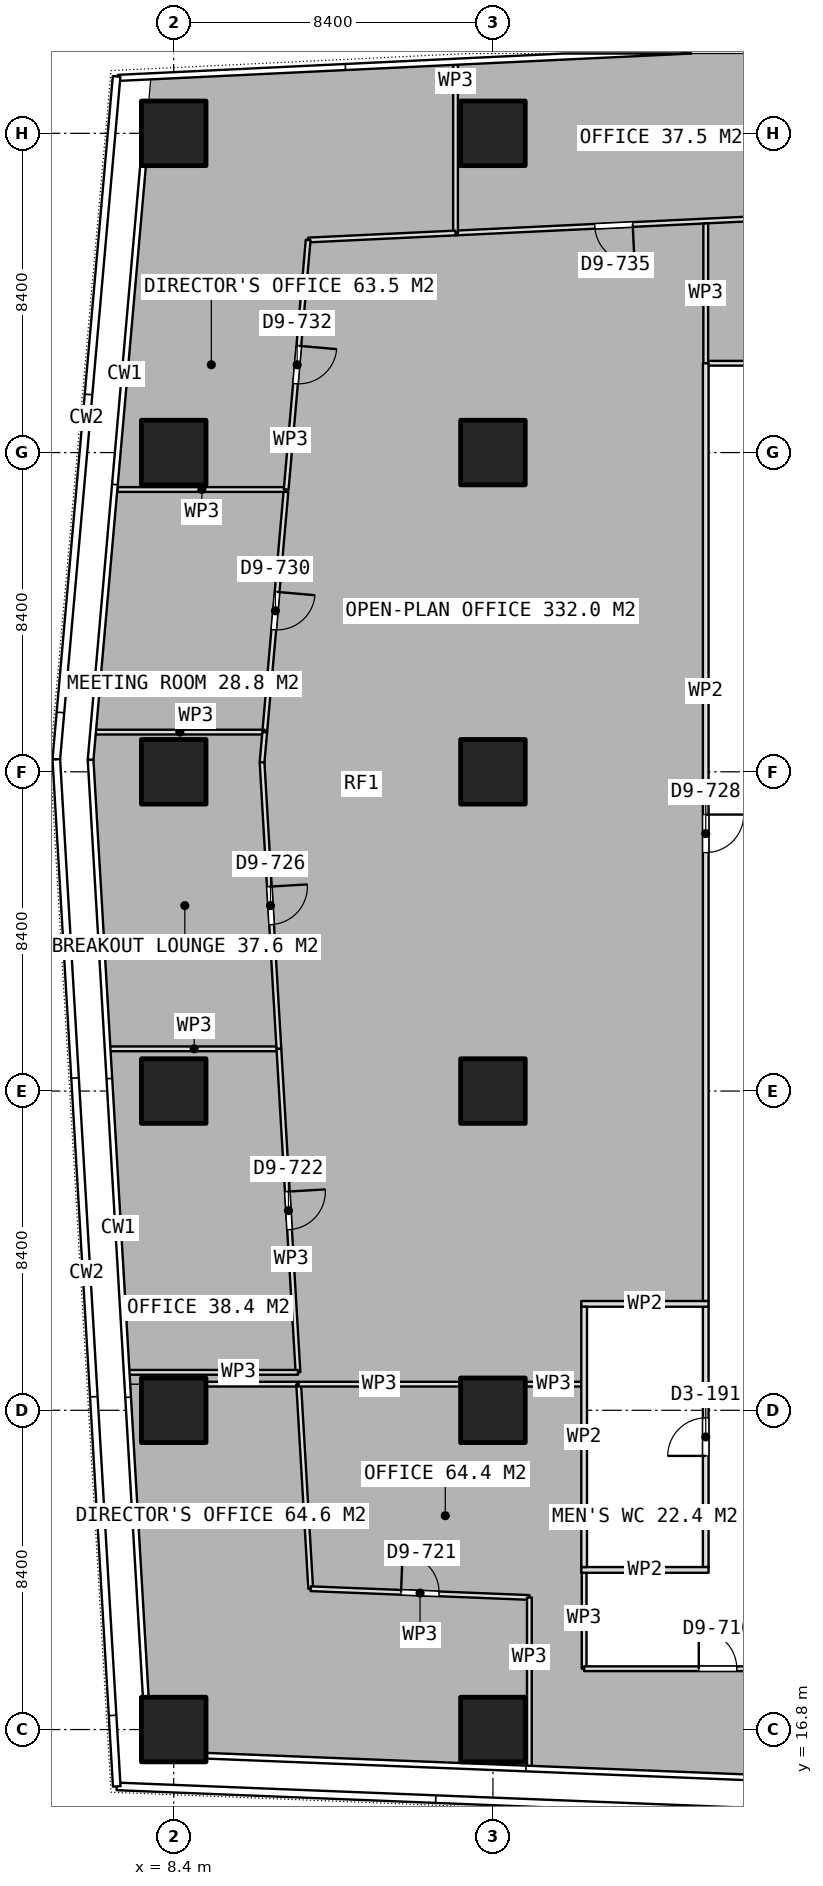
"""IFC4 building model, lengths in metres.
Left out: names, types, materials, properties, quantities, classifications, styles, units other than length and angle.
Written with IfcOpenShell. Run it as: python <this file> out.ifc"""

import sys

from ifc_helpers import new_model, si_unit, direction, frame, frame_2d, origin, origin_2d, place, context, subcontext, project, spatial, rectangle, extrude, element, fill, save


model = new_model("IFC4")
c1 = context("Model", 3, precision=1e-05, world=origin(), true_north=direction((0.0, 1.0)))
c2 = subcontext(c1, "Body", "Model", "MODEL_VIEW")
j1 = project(units=[si_unit("LENGTHUNIT", "METRE"), si_unit("PLANEANGLEUNIT", "RADIAN")], contexts=[c1])
p1 = place(None, origin())
s1 = spatial("IfcSite", under=j1, at=p1, CompositionType="ELEMENT")
p2 = place(p1, origin())
s2 = spatial("IfcBuilding", under=s1, at=p2, CompositionType="ELEMENT")
p3 = place(p2, frame((0.0, 0.0, 183.95)))
s3 = spatial("IfcBuildingStorey", under=s2, at=p3, CompositionType="ELEMENT", Elevation=183.95)
for number, where, z_axis, x_axis in (
    (1, (8.4, 16.8, 0.0), (0.0, 0.0, 1.0), (1.0, 0.0, 0.0)),
    (2, (8.4, 25.2, 0.0), (0.0, 0.0, 1.0), (1.0, 0.0, 0.0)),
    (3, (8.4, 33.6, 0.0), (0.0, 0.0, 1.0), (1.0, 0.0, 0.0)),
    (4, (8.4, 42.0, 0.0), (0.0, 0.0, 1.0), (1.0, 0.0, 0.0)),
    (5, (8.4, 50.4, 0.0), (0.0, 0.0, 1.0), (1.0, 0.0, 0.0)),
    (6, (8.4, 58.8, 0.0), (0.0, 0.0, 1.0), (1.0, 0.0, 0.0)),
    (7, (16.8, 16.8, 0.0), (0.0, 0.0, 1.0), (1.0, 0.0, 0.0)),
    (8, (16.8, 25.2, 0.0), (0.0, 0.0, 1.0), (1.0, 0.0, 0.0)),
    (9, (16.8, 33.6, 0.0), (0.0, 0.0, 1.0), (1.0, 0.0, 0.0)),
    (10, (16.8, 42.0, 0.0), (0.0, 0.0, 1.0), (1.0, 0.0, 0.0)),
    (11, (16.8, 50.4, 0.0), (0.0, 0.0, 1.0), (1.0, 0.0, 0.0)),
    (12, (16.8, 58.8, 0.0), (0.0, 0.0, 1.0), (1.0, 0.0, 0.0)),
):
    element("IfcColumn", number, at=place(p3, frame(where, z_axis=z_axis, x_axis=x_axis)), inside=s3, PredefinedType="COLUMN", context=c2, shape_type="SweptSolid", body=[
        extrude(rectangle(XDim=1.7, YDim=1.7, at=origin_2d()), origin(), (0.0, 0.0, 1.0), 3.75),
    ])
for number, where, z_axis, x_axis in (
    (13, (19.125, 21.0, 0.0), (0.0, 0.0, 1.0), (1.0, 0.0, 0.0)),
    (14, (19.125, 28.0, 0.0), (0.0, 0.0, 1.0), (1.0, 0.0, 0.0)),
):
    element("IfcWall", number, at=place(p3, frame(where, z_axis=z_axis, x_axis=x_axis)), inside=s3, PredefinedType="PARTITIONING", context=c2, shape_type="SweptSolid", body=[
        extrude(rectangle(XDim=3.35, YDim=0.15, at=frame_2d((1.675, 0.0))), origin(), (0.0, 0.0, 1.0), 3.5),
    ])
p4 = place(p3, frame((19.2, 21.075, 0.0), z_axis=(0.0, 0.0, 1.0), x_axis=(0.0, 1.0, 0.0)))
e15 = element("IfcWall", 15, at=p4, inside=s3, PredefinedType="PARTITIONING", context=c2, shape_type="SweptSolid", body=[
    extrude(rectangle(XDim=6.85, YDim=0.15, at=frame_2d((3.425, 0.0))), origin(), (0.0, 0.0, 1.0), 3.5),
])
p5 = place(p3, frame((22.4, 21.075, 0.0), z_axis=(0.0, 0.0, 1.0), x_axis=(0.0, 1.0, 0.0)))
e16 = element("IfcWall", 16, at=p5, inside=s3, PredefinedType="PARTITIONING", context=c2, shape_type="SweptSolid", body=[
    extrude(rectangle(XDim=6.85, YDim=0.15, at=frame_2d((3.425, 0.0))), origin(), (0.0, 0.0, 1.0), 3.5),
])
p6 = place(p5, frame((2.925, 0.0, 0.0)))
e17 = element("IfcOpeningElement", 17, at=p6, cuts=e16, PredefinedType="OPENING", context=c2, shape_type="SweptSolid", body=[
    extrude(rectangle(XDim=1.0, YDim=2.1, at=frame_2d((0.5, 1.05))), frame((0.0, 0.085, 0.0), z_axis=(0.0, -1.0, 0.0), x_axis=(1.0, 0.0, 0.0)), (0.0, 0.0, 1.0), 0.17),
])
p7 = place(p3, frame((9.27, 25.888, 0.0), z_axis=(0.0, 0.0, 1.0), x_axis=(1.0, 0.0, 0.0)))
e18 = element("IfcWall", 18, at=p7, inside=s3, PredefinedType="PARTITIONING", context=c2, shape_type="SweptSolid", body=[
    extrude(rectangle(XDim=2.418, YDim=0.125, at=frame_2d((1.209, 0.0))), origin(), (0.0, 0.0, 1.0), 3.5),
])
p8 = place(p3, frame((11.688, 25.888, 0.0), z_axis=(0.0, 0.0, 1.0), x_axis=(0.058767140917, -0.998271718095, 0.0)))
e19 = element("IfcWall", 19, at=p8, inside=s3, PredefinedType="PARTITIONING", context=c2, shape_type="SweptSolid", body=[
    extrude(rectangle(XDim=5.392, YDim=0.125, at=frame_2d((2.696, 0.0))), origin(), (0.0, 0.0, 1.0), 3.5),
])
p9 = place(p3, frame((12.005, 20.505, 0.0), z_axis=(0.0, 0.0, 1.0), x_axis=(0.999202244946, -0.039935869776, 0.0)))
e20 = element("IfcWall", 20, at=p9, inside=s3, PredefinedType="PARTITIONING", context=c2, shape_type="SweptSolid", body=[
    extrude(rectangle(XDim=5.759, YDim=0.125, at=frame_2d((2.879, 0.0))), origin(), (0.0, 0.0, 1.0), 3.5),
])
p10 = place(p9, frame((2.379, 0.0, 0.0)))
e21 = element("IfcOpeningElement", 21, at=p10, cuts=e20, PredefinedType="OPENING", context=c2, shape_type="SweptSolid", body=[
    extrude(rectangle(XDim=1.0, YDim=2.1, at=frame_2d((0.5, 1.05))), frame((0.0, 0.073, 0.0), z_axis=(0.0, -1.0, 0.0), x_axis=(1.0, 0.0, 0.0)), (0.0, 0.0, 1.0), 0.145),
])
p11 = place(p3, frame((17.759, 20.275, 0.0), z_axis=(0.0, 0.0, 1.0), x_axis=(0.0, -1.0, 0.0)))
e22 = element("IfcWall", 22, at=p11, inside=s3, PredefinedType="PARTITIONING", context=c2, shape_type="SweptSolid", body=[
    extrude(rectangle(XDim=4.453, YDim=0.125, at=frame_2d((2.227, 0.0))), origin(), (0.0, 0.0, 1.0), 3.5),
])
p12 = place(p3, frame((11.688, 25.888, 0.0), z_axis=(0.0, 0.0, 1.0), x_axis=(1.0, 0.0, 0.0)))
e23 = element("IfcWall", 23, at=p12, inside=s3, PredefinedType="PARTITIONING", context=c2, shape_type="SweptSolid", body=[
    extrude(rectangle(XDim=4.242, YDim=0.125, at=frame_2d((2.121, 0.0))), origin(), (0.0, 0.0, 1.0), 3.5),
])
p13 = place(p3, frame((17.67, 25.888, 0.0), z_axis=(0.0, 0.0, 1.0), x_axis=(1.0, 0.0, 0.0)))
e24 = element("IfcWall", 24, at=p13, inside=s3, PredefinedType="PARTITIONING", context=c2, shape_type="SweptSolid", body=[
    extrude(rectangle(XDim=1.455, YDim=0.125, at=frame_2d((0.728, 0.0))), origin(), (0.0, 0.0, 1.0), 3.5),
])
p14 = place(p3, frame((19.2, 21.075, 0.0), z_axis=(0.0, 0.0, 1.0), x_axis=(0.0, -1.0, 0.0)))
e25 = element("IfcWall", 25, at=p14, inside=s3, PredefinedType="PARTITIONING", context=c2, shape_type="SweptSolid", body=[
    extrude(rectangle(XDim=2.675, YDim=0.125, at=frame_2d((1.337, 0.0))), origin(), (0.0, 0.0, 1.0), 3.5),
])
p15 = place(p3, frame((19.2, 18.4, 0.0), z_axis=(0.0, 0.0, 1.0), x_axis=(1.0, 0.0, 0.0)))
e26 = element("IfcWall", 26, at=p15, inside=s3, PredefinedType="PARTITIONING", context=c2, shape_type="SweptSolid", body=[
    extrude(rectangle(XDim=7.033, YDim=0.125, at=frame_2d((3.517, 0.0))), origin(), (0.0, 0.0, 1.0), 3.5),
])
p16 = place(p15, frame((3.017, 0.0, 0.0)))
e27 = element("IfcOpeningElement", 27, at=p16, cuts=e26, PredefinedType="OPENING", context=c2, shape_type="SweptSolid", body=[
    extrude(rectangle(XDim=1.0, YDim=2.1, at=frame_2d((0.5, 1.05))), frame((0.0, 0.073, 0.0), z_axis=(0.0, -1.0, 0.0), x_axis=(1.0, 0.0, 0.0)), (0.0, 0.0, 1.0), 0.145),
])
p17 = place(p3, frame((24.142, 56.576, 0.0), z_axis=(0.0, 0.0, 1.0), x_axis=(-0.998859773086, -0.047740482938, 0.0)))
e28 = element("IfcWall", 28, at=p17, inside=s3, PredefinedType="PARTITIONING", context=c2, shape_type="SweptSolid", body=[
    extrude(rectangle(XDim=8.336, YDim=0.125, at=frame_2d((4.168, 0.0))), origin(), (0.0, 0.0, 1.0), 3.5),
])
p18 = place(p17, frame((3.668, 0.0, 0.0)))
e29 = element("IfcOpeningElement", 29, at=p18, cuts=e28, PredefinedType="OPENING", context=c2, shape_type="SweptSolid", body=[
    extrude(rectangle(XDim=1.0, YDim=2.1, at=frame_2d((0.5, 1.05))), frame((0.0, 0.073, 0.0), z_axis=(0.0, -1.0, 0.0), x_axis=(1.0, 0.0, 0.0)), (0.0, 0.0, 1.0), 0.145),
])
p19 = place(p3, frame((15.816, 56.178, 0.0), z_axis=(0.0, 0.0, 1.0), x_axis=(0.0, 1.0, 0.0)))
e30 = element("IfcWall", 30, at=p19, inside=s3, PredefinedType="PARTITIONING", context=c2, shape_type="SweptSolid", body=[
    extrude(rectangle(XDim=4.455, YDim=0.125, at=frame_2d((2.228, 0.0))), origin(), (0.0, 0.0, 1.0), 3.5),
])
p20 = place(p3, frame((11.359, 49.428, 0.0), z_axis=(0.0, 0.0, 1.0), x_axis=(-1.0, 0.0, 0.0)))
e31 = element("IfcWall", 31, at=p20, inside=s3, PredefinedType="PARTITIONING", context=c2, shape_type="SweptSolid", body=[
    extrude(rectangle(XDim=4.438, YDim=0.125, at=frame_2d((2.219, 0.0))), origin(), (0.0, 0.0, 1.0), 3.5),
])
p21 = place(p3, frame((15.815, 56.178, 0.0), z_axis=(0.0, 0.0, 1.0), x_axis=(-0.998862723519, -0.047678711866, 0.0)))
e32 = element("IfcWall", 32, at=p21, inside=s3, PredefinedType="PARTITIONING", context=c2, shape_type="SweptSolid", body=[
    extrude(rectangle(XDim=3.881, YDim=0.125, at=frame_2d((1.941, 0.0))), origin(), (0.0, 0.0, 1.0), 3.5),
])
p22 = place(p3, frame((11.938, 55.993, 0.0), z_axis=(0.0, 0.0, 1.0), x_axis=(-0.087870025349, -0.996131948411, 0.0)))
e33 = element("IfcWall", 33, at=p22, inside=s3, PredefinedType="PARTITIONING", context=c2, shape_type="SweptSolid", body=[
    extrude(rectangle(XDim=6.59, YDim=0.125, at=frame_2d((3.295, 0.0))), origin(), (0.0, 0.0, 1.0), 3.5),
])
p23 = place(p22, frame((2.795, 0.0, 0.0)))
e34 = element("IfcOpeningElement", 34, at=p23, cuts=e33, PredefinedType="OPENING", context=c2, shape_type="SweptSolid", body=[
    extrude(rectangle(XDim=1.0, YDim=2.1, at=frame_2d((0.5, 1.05))), frame((0.0, 0.073, 0.0), z_axis=(0.0, -1.0, 0.0), x_axis=(1.0, 0.0, 0.0)), (0.0, 0.0, 1.0), 0.145),
])
p24 = place(p3, frame((11.353, 49.365, 0.0), z_axis=(0.0, 0.0, 1.0), x_axis=(-0.087964559847, -0.996123604886, 0.0)))
e35 = element("IfcWall", 35, at=p24, inside=s3, PredefinedType="PARTITIONING", context=c2, shape_type="SweptSolid", body=[
    extrude(rectangle(XDim=6.345, YDim=0.125, at=frame_2d((3.172, 0.0))), origin(), (0.0, 0.0, 1.0), 3.5),
])
p25 = place(p24, frame((2.641, 0.0, 0.0)))
e36 = element("IfcOpeningElement", 36, at=p25, cuts=e35, PredefinedType="OPENING", context=c2, shape_type="SweptSolid", body=[
    extrude(rectangle(XDim=1.0, YDim=2.1, at=frame_2d((0.5, 1.05))), frame((0.0, 0.073, 0.0), z_axis=(0.0, -1.0, 0.0), x_axis=(1.0, 0.0, 0.0)), (0.0, 0.0, 1.0), 0.145),
])
p26 = place(p3, frame((10.795, 43.045, 0.0), z_axis=(0.0, 0.0, 1.0), x_axis=(-1.0, 0.0, 0.0)))
e37 = element("IfcWall", 37, at=p26, inside=s3, PredefinedType="PARTITIONING", context=c2, shape_type="SweptSolid", body=[
    extrude(rectangle(XDim=4.468, YDim=0.125, at=frame_2d((2.234, 0.0))), origin(), (0.0, 0.0, 1.0), 3.5),
])
p27 = place(p3, frame((11.168, 34.711, 0.0), z_axis=(0.0, 0.0, 1.0), x_axis=(-1.0, 0.0, 0.0)))
e38 = element("IfcWall", 38, at=p27, inside=s3, PredefinedType="PARTITIONING", context=c2, shape_type="SweptSolid", body=[
    extrude(rectangle(XDim=4.458, YDim=0.125, at=frame_2d((2.229, 0.0))), origin(), (0.0, 0.0, 1.0), 3.5),
])
p28 = place(p3, frame((10.795, 43.044, 0.0), z_axis=(0.0, 0.0, 1.0), x_axis=(-0.08750093035, -0.996164437825, 0.0)))
e39 = element("IfcWall", 39, at=p28, inside=s3, PredefinedType="PARTITIONING", context=c2, shape_type="SweptSolid", body=[
    extrude(rectangle(XDim=0.798, YDim=0.125, at=frame_2d((0.399, 0.0))), origin(), (0.0, 0.0, 1.0), 3.5),
])
p29 = place(p3, frame((10.725, 42.249, 0.0), z_axis=(0.0, 0.0, 1.0), x_axis=(0.058649999786, -0.998278607166, 0.0)))
e40 = element("IfcWall", 40, at=p29, inside=s3, PredefinedType="PARTITIONING", context=c2, shape_type="SweptSolid", body=[
    extrude(rectangle(XDim=7.551, YDim=0.125, at=frame_2d((3.775, 0.0))), origin(), (0.0, 0.0, 1.0), 3.5),
])
p30 = place(p29, frame((3.276, 0.0, 0.0)))
e41 = element("IfcOpeningElement", 41, at=p30, cuts=e40, PredefinedType="OPENING", context=c2, shape_type="SweptSolid", body=[
    extrude(rectangle(XDim=1.0, YDim=2.1, at=frame_2d((0.5, 1.05))), frame((0.0, 0.073, 0.0), z_axis=(0.0, -1.0, 0.0), x_axis=(1.0, 0.0, 0.0)), (0.0, 0.0, 1.0), 0.145),
])
p31 = place(p3, frame((11.168, 34.71, 0.0), z_axis=(0.0, 0.0, 1.0), x_axis=(0.058874777336, -0.998265375836, 0.0)))
e42 = element("IfcWall", 42, at=p31, inside=s3, PredefinedType="PARTITIONING", context=c2, shape_type="SweptSolid", body=[
    extrude(rectangle(XDim=8.526, YDim=0.125, at=frame_2d((4.263, 0.0))), origin(), (0.0, 0.0, 1.0), 3.5),
])
p32 = place(p31, frame((3.763, 0.0, 0.0)))
e43 = element("IfcOpeningElement", 43, at=p32, cuts=e42, PredefinedType="OPENING", context=c2, shape_type="SweptSolid", body=[
    extrude(rectangle(XDim=1.0, YDim=2.1, at=frame_2d((0.5, 1.05))), frame((0.0, 0.073, 0.0), z_axis=(0.0, -1.0, 0.0), x_axis=(1.0, 0.0, 0.0)), (0.0, 0.0, 1.0), 0.145),
])
p33 = place(p3, frame((11.67, 26.199, 0.0), z_axis=(0.0, 0.0, 1.0), x_axis=(-1.0, 0.0, 0.0)))
e44 = element("IfcWall", 44, at=p33, inside=s3, PredefinedType="PARTITIONING", context=c2, shape_type="SweptSolid", body=[
    extrude(rectangle(XDim=4.458, YDim=0.125, at=frame_2d((2.229, 0.0))), origin(), (0.0, 0.0, 1.0), 3.5),
])
p34 = place(p3, frame((28.4, 52.75, 0.0), z_axis=(0.0, 0.0, 1.0), x_axis=(-1.0, 0.0, 0.0)))
e45 = element("IfcWall", 45, at=p34, inside=s3, PredefinedType="PARTITIONING", context=c2, shape_type="SweptSolid", body=[
    extrude(rectangle(XDim=6.0, YDim=0.125, at=frame_2d((3.0, 0.0))), origin(), (0.0, 0.0, 1.0), 3.5),
])
p35 = place(p34, frame((2.5, 0.0, 0.0)))
e46 = element("IfcOpeningElement", 46, at=p35, cuts=e45, PredefinedType="OPENING", context=c2, shape_type="SweptSolid", body=[
    extrude(rectangle(XDim=1.0, YDim=2.1, at=frame_2d((0.5, 1.05))), frame((0.0, 0.073, 0.0), z_axis=(0.0, -1.0, 0.0), x_axis=(1.0, 0.0, 0.0)), (0.0, 0.0, 1.0), 0.145),
])
p36 = place(p3, frame((22.4, 52.75, 0.0), z_axis=(0.0, 0.0, 1.0), x_axis=(0.0, 1.0, 0.0)))
e47 = element("IfcWall", 47, at=p36, inside=s3, PredefinedType="PARTITIONING", context=c2, shape_type="SweptSolid", body=[
    extrude(rectangle(XDim=3.68, YDim=0.125, at=frame_2d((1.84, 0.0))), origin(), (0.0, 0.0, 1.0), 3.5),
])
p37 = place(p3, frame((22.4, 52.75, 0.0), z_axis=(0.0, 0.0, 1.0), x_axis=(0.0, -1.0, 0.0)))
e48 = element("IfcWall", 48, at=p37, inside=s3, PredefinedType="PARTITIONING", context=c2, shape_type="SweptSolid", body=[
    extrude(rectangle(XDim=24.675, YDim=0.15, at=frame_2d((12.337, 0.0))), origin(), (0.0, 0.0, 1.0), 3.5),
])
p38 = place(p37, frame((11.875, 0.0, 0.0)))
e49 = element("IfcOpeningElement", 49, at=p38, cuts=e48, PredefinedType="OPENING", context=c2, shape_type="SweptSolid", body=[
    extrude(rectangle(XDim=1.0, YDim=2.1, at=frame_2d((0.5, 1.05))), frame((0.0, 0.085, 0.0), z_axis=(0.0, -1.0, 0.0), x_axis=(1.0, 0.0, 0.0)), (0.0, 0.0, 1.0), 0.17),
])
p39 = place(p6, origin())
e50 = element("IfcDoor", 50, at=p39, inside=s3, OperationType="SINGLE_SWING_LEFT", PredefinedType="DOOR", context=c2, shape_type="SweptSolid", body=[
    extrude(rectangle(XDim=1.0, YDim=2.1, at=frame_2d((0.5, 1.05))), frame((0.0, 0.025, 0.0), z_axis=(0.0, -1.0, 0.0), x_axis=(1.0, 0.0, 0.0)), (0.0, 0.0, 1.0), 0.05),
])
fill(e17, e50)
p40 = place(p16, origin())
e51 = element("IfcDoor", 51, at=p40, inside=s3, OperationType="SINGLE_SWING_LEFT", PredefinedType="DOOR", context=c2, shape_type="SweptSolid", body=[
    extrude(rectangle(XDim=1.0, YDim=2.1, at=frame_2d((0.5, 1.05))), frame((0.0, 0.025, 0.0), z_axis=(0.0, -1.0, 0.0), x_axis=(1.0, 0.0, 0.0)), (0.0, 0.0, 1.0), 0.05),
])
fill(e27, e51)
p41 = place(p18, origin())
e52 = element("IfcDoor", 52, at=p41, inside=s3, OperationType="SINGLE_SWING_LEFT", PredefinedType="DOOR", context=c2, shape_type="SweptSolid", body=[
    extrude(rectangle(XDim=1.0, YDim=2.1, at=frame_2d((0.5, 1.05))), frame((0.0, 0.025, 0.0), z_axis=(0.0, -1.0, 0.0), x_axis=(1.0, 0.0, 0.0)), (0.0, 0.0, 1.0), 0.05),
])
fill(e29, e52)
p42 = place(p23, origin())
e53 = element("IfcDoor", 53, at=p42, inside=s3, OperationType="SINGLE_SWING_LEFT", PredefinedType="DOOR", context=c2, shape_type="SweptSolid", body=[
    extrude(rectangle(XDim=1.0, YDim=2.1, at=frame_2d((0.5, 1.05))), frame((0.0, 0.025, 0.0), z_axis=(0.0, -1.0, 0.0), x_axis=(1.0, 0.0, 0.0)), (0.0, 0.0, 1.0), 0.05),
])
fill(e34, e53)
p43 = place(p25, origin())
e54 = element("IfcDoor", 54, at=p43, inside=s3, OperationType="SINGLE_SWING_LEFT", PredefinedType="DOOR", context=c2, shape_type="SweptSolid", body=[
    extrude(rectangle(XDim=1.0, YDim=2.1, at=frame_2d((0.5, 1.05))), frame((0.0, 0.025, 0.0), z_axis=(0.0, -1.0, 0.0), x_axis=(1.0, 0.0, 0.0)), (0.0, 0.0, 1.0), 0.05),
])
fill(e36, e54)
p44 = place(p30, origin())
e55 = element("IfcDoor", 55, at=p44, inside=s3, OperationType="SINGLE_SWING_LEFT", PredefinedType="DOOR", context=c2, shape_type="SweptSolid", body=[
    extrude(rectangle(XDim=1.0, YDim=2.1, at=frame_2d((0.5, 1.05))), frame((0.0, 0.025, 0.0), z_axis=(0.0, -1.0, 0.0), x_axis=(1.0, 0.0, 0.0)), (0.0, 0.0, 1.0), 0.05),
])
fill(e41, e55)
p45 = place(p32, origin())
e56 = element("IfcDoor", 56, at=p45, inside=s3, OperationType="SINGLE_SWING_LEFT", PredefinedType="DOOR", context=c2, shape_type="SweptSolid", body=[
    extrude(rectangle(XDim=1.0, YDim=2.1, at=frame_2d((0.5, 1.05))), frame((0.0, 0.025, 0.0), z_axis=(0.0, -1.0, 0.0), x_axis=(1.0, 0.0, 0.0)), (0.0, 0.0, 1.0), 0.05),
])
fill(e43, e56)
p46 = place(p38, origin())
e57 = element("IfcDoor", 57, at=p46, inside=s3, OperationType="SINGLE_SWING_LEFT", PredefinedType="DOOR", context=c2, shape_type="SweptSolid", body=[
    extrude(rectangle(XDim=1.0, YDim=2.1, at=frame_2d((0.5, 1.05))), frame((0.0, 0.025, 0.0), z_axis=(0.0, -1.0, 0.0), x_axis=(1.0, 0.0, 0.0)), (0.0, 0.0, 1.0), 0.05),
])
fill(e49, e57)
p47 = place(p10, origin())
e58 = element("IfcDoor", 58, at=p47, inside=s3, OperationType="SINGLE_SWING_LEFT", PredefinedType="DOOR", context=c2, shape_type="SweptSolid", body=[
    extrude(rectangle(XDim=1.0, YDim=2.1, at=frame_2d((0.5, 1.05))), frame((0.0, 0.025, 0.0), z_axis=(0.0, -1.0, 0.0), x_axis=(1.0, 0.0, 0.0)), (0.0, 0.0, 1.0), 0.05),
])
fill(e21, e58)
save(model, sys.argv[1])
